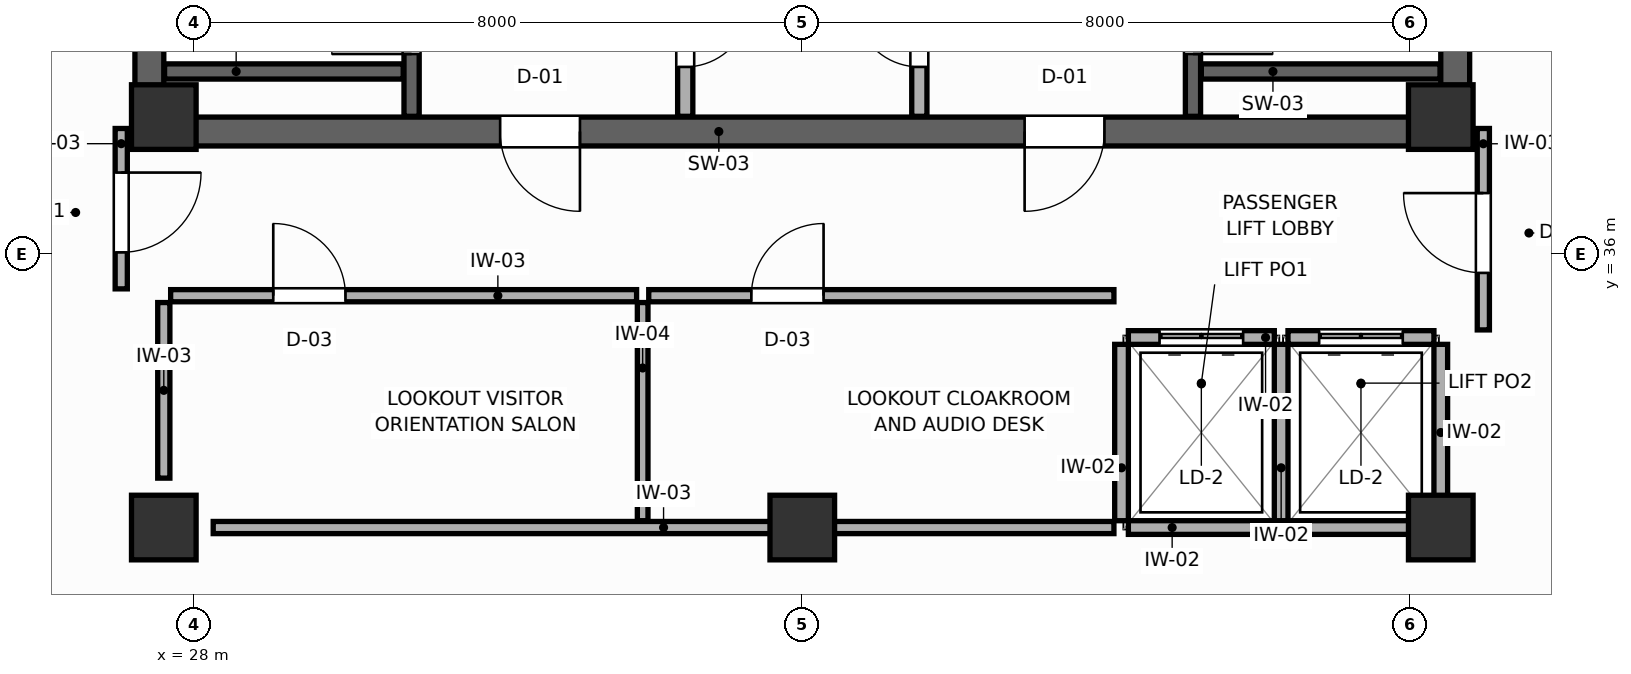
"""IFC4 building model, lengths in metres.
Left out: names, types, materials, properties, quantities, classifications, styles, units other than length and angle.
Written with IfcOpenShell. Run it as: python <this file> out.ifc"""

import sys

from ifc_helpers import new_model, si_unit, direction, frame, frame_2d, origin, origin_2d, place, context, subcontext, project, spatial, rectangle, extrude, source, transform, mapped, element, fill, save


model = new_model("IFC4")
c1 = context("Model", 3, precision=1e-05, world=origin(), true_north=direction((0.0, 1.0)))
c2 = subcontext(c1, "Body", "Model", "MODEL_VIEW")
j1 = project(units=[si_unit("LENGTHUNIT", "METRE"), si_unit("PLANEANGLEUNIT", "RADIAN")], contexts=[c1])
p1 = place(None, origin())
s1 = spatial("IfcSite", under=j1, at=p1, CompositionType="ELEMENT")
p2 = place(p1, origin())
s2 = spatial("IfcBuilding", under=s1, at=p2, CompositionType="ELEMENT")
p3 = place(p2, frame((0.0, 0.0, 288.0)))
s3 = spatial("IfcBuildingStorey", under=s2, at=p3, CompositionType="ELEMENT", Elevation=288.0)
p4 = place(p3, frame((27.22, 37.61, 0.0), z_axis=(0.0, 0.0, 1.0), x_axis=(1.0, 0.0, 0.0)))
e1 = element("IfcWall", 1, at=p4, inside=s3, PredefinedType="SHEAR", context=c2, shape_type="SweptSolid", body=[
    extrude(rectangle(XDim=17.56, YDim=0.38, at=frame_2d((8.78, 0.0))), origin(), (0.0, 0.0, 1.0), 4.2),
])
p5 = place(p4, frame((4.805, 0.0, 0.0)))
e2 = element("IfcOpeningElement", 2, at=p5, cuts=e1, PredefinedType="OPENING", context=c2, shape_type="SweptSolid", body=[
    extrude(rectangle(XDim=1.05, YDim=2.1, at=frame_2d((0.525, 1.05))), frame((0.0, 0.2, 0.0), z_axis=(0.0, -1.0, 0.0), x_axis=(1.0, 0.0, 0.0)), (0.0, 0.0, 1.0), 0.4),
])
p6 = place(p4, frame((11.705, 0.0, 0.0)))
e3 = element("IfcOpeningElement", 3, at=p6, cuts=e1, PredefinedType="OPENING", context=c2, shape_type="SweptSolid", body=[
    extrude(rectangle(XDim=1.05, YDim=2.1, at=frame_2d((0.525, 1.05))), frame((0.0, 0.2, 0.0), z_axis=(0.0, -1.0, 0.0), x_axis=(1.0, 0.0, 0.0)), (0.0, 0.0, 1.0), 0.4),
])
for number, where, z_axis, x_axis in (
    (4, (27.41, 37.8, 0.0), (0.0, 0.0, 1.0), (0.0, 1.0, 0.0)),
    (5, (44.59, 37.8, 0.0), (0.0, 0.0, 1.0), (0.0, 1.0, 0.0)),
):
    element("IfcWall", number, at=place(p3, frame(where, z_axis=z_axis, x_axis=x_axis)), inside=s3, PredefinedType="SHEAR", context=c2, shape_type="SweptSolid", body=[
        extrude(rectangle(XDim=9.0, YDim=0.38, at=frame_2d((4.5, 0.0))), origin(), (0.0, 0.0, 1.0), 4.2),
    ])
m1 = source(origin(), c2, "Body", "SweptSolid", [
    extrude(rectangle(XDim=0.85, YDim=0.85, at=origin_2d()), origin(), (0.0, 0.0, 1.0), 4.2),
])
for number, where, z_axis, x_axis in (
    (6, (27.6, 37.8, 0.0), (0.0, 0.0, 1.0), (1.0, 0.0, 0.0)),
    (7, (44.4, 37.8, 0.0), (0.0, 0.0, 1.0), (1.0, 0.0, 0.0)),
    (8, (27.6, 32.4, 0.0), (0.0, 0.0, 1.0), (1.0, 0.0, 0.0)),
    (9, (44.4, 32.4, 0.0), (0.0, 0.0, 1.0), (1.0, 0.0, 0.0)),
    (10, (36.0, 32.4, 0.0), (0.0, 0.0, 1.0), (1.0, 0.0, 0.0)),
):
    element("IfcColumn", number, at=place(p3, frame(where, z_axis=z_axis, x_axis=x_axis)), inside=s3, PredefinedType="COLUMN", context=c2, shape_type="MappedRepresentation", body=[
        mapped(m1, transform((0.0, 0.0, 0.0), scale=1.0)),
    ])
p7 = place(p3, frame((30.86, 37.81, 0.0), z_axis=(0.0, 0.0, 1.0), x_axis=(0.0, 1.0, 0.0)))
e11 = element("IfcWall", 11, at=p7, inside=s3, PredefinedType="SHEAR", context=c2, shape_type="SweptSolid", body=[
    extrude(rectangle(XDim=8.98, YDim=0.2, at=frame_2d((4.49, 0.0))), origin(), (0.0, 0.0, 1.0), 4.2),
])
p8 = place(p7, frame((0.82, 0.0, 0.0)))
e12 = element("IfcOpeningElement", 12, at=p8, cuts=e11, PredefinedType="OPENING", context=c2, shape_type="SweptSolid", body=[
    extrude(rectangle(XDim=1.05, YDim=2.1, at=frame_2d((0.525, 1.05))), frame((0.0, 0.11, 0.0), z_axis=(0.0, -1.0, 0.0), x_axis=(1.0, 0.0, 0.0)), (0.0, 0.0, 1.0), 0.22),
])
p9 = place(p3, frame((27.61, 38.4, 0.0), z_axis=(0.0, 0.0, 1.0), x_axis=(1.0, 0.0, 0.0)))
e13 = element("IfcWall", 13, at=p9, inside=s3, PredefinedType="SHEAR", context=c2, shape_type="SweptSolid", body=[
    extrude(rectangle(XDim=3.14, YDim=0.2, at=frame_2d((1.57, 0.0))), origin(), (0.0, 0.0, 1.0), 4.2),
])
p10 = place(p3, frame((41.14, 37.81, 0.0), z_axis=(0.0, 0.0, 1.0), x_axis=(0.0, 1.0, 0.0)))
e14 = element("IfcWall", 14, at=p10, inside=s3, PredefinedType="SHEAR", context=c2, shape_type="SweptSolid", body=[
    extrude(rectangle(XDim=8.98, YDim=0.2, at=frame_2d((4.49, 0.0))), origin(), (0.0, 0.0, 1.0), 4.2),
])
p11 = place(p10, frame((0.82, 0.0, 0.0)))
e15 = element("IfcOpeningElement", 15, at=p11, cuts=e14, PredefinedType="OPENING", context=c2, shape_type="SweptSolid", body=[
    extrude(rectangle(XDim=1.05, YDim=2.1, at=frame_2d((0.525, 1.05))), frame((0.0, 0.11, 0.0), z_axis=(0.0, -1.0, 0.0), x_axis=(1.0, 0.0, 0.0)), (0.0, 0.0, 1.0), 0.22),
])
p12 = place(p3, frame((41.25, 38.4, 0.0), z_axis=(0.0, 0.0, 1.0), x_axis=(1.0, 0.0, 0.0)))
e16 = element("IfcWall", 16, at=p12, inside=s3, PredefinedType="SHEAR", context=c2, shape_type="SweptSolid", body=[
    extrude(rectangle(XDim=3.14, YDim=0.2, at=frame_2d((1.57, 0.0))), origin(), (0.0, 0.0, 1.0), 4.2),
])
p13 = place(p3, frame((34.46, 37.81, 0.0), z_axis=(0.0, 0.0, 1.0), x_axis=(0.0, 1.0, 0.0)))
e17 = element("IfcWall", 17, at=p13, inside=s3, PredefinedType="PARTITIONING", context=c2, shape_type="SweptSolid", body=[
    extrude(rectangle(XDim=8.98, YDim=0.2, at=frame_2d((4.49, 0.0))), origin(), (0.0, 0.0, 1.0), 3.95),
])
p14 = place(p13, frame((0.65, 0.0, 0.0)))
e18 = element("IfcOpeningElement", 18, at=p14, cuts=e17, PredefinedType="OPENING", context=c2, shape_type="SweptSolid", body=[
    extrude(rectangle(XDim=0.85, YDim=2.05, at=frame_2d((0.425, 1.025))), frame((0.0, 0.11, 0.0), z_axis=(0.0, -1.0, 0.0), x_axis=(1.0, 0.0, 0.0)), (0.0, 0.0, 1.0), 0.22),
])
p15 = place(p3, frame((37.54, 37.81, 0.0), z_axis=(0.0, 0.0, 1.0), x_axis=(0.0, 1.0, 0.0)))
e19 = element("IfcWall", 19, at=p15, inside=s3, PredefinedType="PARTITIONING", context=c2, shape_type="SweptSolid", body=[
    extrude(rectangle(XDim=8.98, YDim=0.2, at=frame_2d((4.49, 0.0))), origin(), (0.0, 0.0, 1.0), 3.95),
])
p16 = place(p15, frame((0.65, 0.0, 0.0)))
e20 = element("IfcOpeningElement", 20, at=p16, cuts=e19, PredefinedType="OPENING", context=c2, shape_type="SweptSolid", body=[
    extrude(rectangle(XDim=0.85, YDim=2.05, at=frame_2d((0.425, 1.025))), frame((0.0, 0.11, 0.0), z_axis=(0.0, -1.0, 0.0), x_axis=(1.0, 0.0, 0.0)), (0.0, 0.0, 1.0), 0.22),
])
p17 = place(p3, frame((40.29, 34.9, 0.0), z_axis=(0.0, 0.0, 1.0), x_axis=(1.0, 0.0, 0.0)))
e21 = element("IfcWall", 21, at=p17, inside=s3, PredefinedType="PARTITIONING", context=c2, shape_type="SweptSolid", body=[
    extrude(rectangle(XDim=1.92, YDim=0.18, at=frame_2d((0.96, 0.0))), origin(), (0.0, 0.0, 1.0), 3.95),
])
p18 = place(p17, frame((0.41, 0.0, 0.0)))
e22 = element("IfcOpeningElement", 22, at=p18, cuts=e21, PredefinedType="OPENING", context=c2, shape_type="SweptSolid", body=[
    extrude(rectangle(XDim=1.1, YDim=2.1, at=frame_2d((0.55, 1.05))), frame((0.0, 0.1, 0.0), z_axis=(0.0, -1.0, 0.0), x_axis=(1.0, 0.0, 0.0)), (0.0, 0.0, 1.0), 0.2),
])
p19 = place(p3, frame((40.29, 32.4, 0.0), z_axis=(0.0, 0.0, 1.0), x_axis=(1.0, 0.0, 0.0)))
e23 = element("IfcWall", 23, at=p19, inside=s3, PredefinedType="PARTITIONING", context=c2, shape_type="SweptSolid", body=[
    extrude(rectangle(XDim=1.92, YDim=0.18, at=frame_2d((0.96, 0.0))), origin(), (0.0, 0.0, 1.0), 2.51),
])
p20 = place(p3, frame((40.2, 32.49, 0.0), z_axis=(0.0, 0.0, 1.0), x_axis=(0.0, 1.0, 0.0)))
e24 = element("IfcWall", 24, at=p20, inside=s3, PredefinedType="PARTITIONING", context=c2, shape_type="SweptSolid", body=[
    extrude(rectangle(XDim=2.32, YDim=0.18, at=frame_2d((1.16, 0.0))), origin(), (0.0, 0.0, 1.0), 3.95),
])
p21 = place(p3, frame((42.39, 34.9, 0.0), z_axis=(0.0, 0.0, 1.0), x_axis=(1.0, 0.0, 0.0)))
e25 = element("IfcWall", 25, at=p21, inside=s3, PredefinedType="PARTITIONING", context=c2, shape_type="SweptSolid", body=[
    extrude(rectangle(XDim=1.92, YDim=0.18, at=frame_2d((0.96, 0.0))), origin(), (0.0, 0.0, 1.0), 3.95),
])
p22 = place(p21, frame((0.41, 0.0, 0.0)))
e26 = element("IfcOpeningElement", 26, at=p22, cuts=e25, PredefinedType="OPENING", context=c2, shape_type="SweptSolid", body=[
    extrude(rectangle(XDim=1.1, YDim=2.1, at=frame_2d((0.55, 1.05))), frame((0.0, 0.1, 0.0), z_axis=(0.0, -1.0, 0.0), x_axis=(1.0, 0.0, 0.0)), (0.0, 0.0, 1.0), 0.2),
])
p23 = place(p3, frame((42.39, 32.4, 0.0), z_axis=(0.0, 0.0, 1.0), x_axis=(1.0, 0.0, 0.0)))
e27 = element("IfcWall", 27, at=p23, inside=s3, PredefinedType="PARTITIONING", context=c2, shape_type="SweptSolid", body=[
    extrude(rectangle(XDim=1.92, YDim=0.18, at=frame_2d((0.96, 0.0))), origin(), (0.0, 0.0, 1.0), 2.51),
])
for number, where, z_axis, x_axis in (
    (28, (42.3, 32.49, 0.0), (0.0, 0.0, 1.0), (0.0, 1.0, 0.0)),
    (29, (44.4, 32.49, 0.0), (0.0, 0.0, 1.0), (0.0, 1.0, 0.0)),
):
    element("IfcWall", number, at=place(p3, frame(where, z_axis=z_axis, x_axis=x_axis)), inside=s3, PredefinedType="PARTITIONING", context=c2, shape_type="SweptSolid", body=[
        extrude(rectangle(XDim=2.32, YDim=0.18, at=frame_2d((1.16, 0.0))), origin(), (0.0, 0.0, 1.0), 3.95),
    ])
p24 = place(p3, frame((28.25, 32.4, 0.0), z_axis=(0.0, 0.0, 1.0), x_axis=(1.0, 0.0, 0.0)))
e30 = element("IfcWall", 30, at=p24, inside=s3, PredefinedType="PARTITIONING", context=c2, shape_type="SweptSolid", body=[
    extrude(rectangle(XDim=11.85, YDim=0.16, at=frame_2d((5.925, 0.0))), origin(), (0.0, 0.0, 1.0), 2.51),
])
p25 = place(p3, frame((27.6, 33.05, 0.0), z_axis=(0.0, 0.0, 1.0), x_axis=(0.0, 1.0, 0.0)))
e31 = element("IfcWall", 31, at=p25, inside=s3, PredefinedType="PARTITIONING", context=c2, shape_type="SweptSolid", body=[
    extrude(rectangle(XDim=2.31, YDim=0.16, at=frame_2d((1.155, 0.0))), origin(), (0.0, 0.0, 1.0), 3.95),
])
p26 = place(p3, frame((33.9, 32.49, 0.0), z_axis=(0.0, 0.0, 1.0), x_axis=(0.0, 1.0, 0.0)))
e32 = element("IfcWall", 32, at=p26, inside=s3, PredefinedType="PARTITIONING", context=c2, shape_type="SweptSolid", body=[
    extrude(rectangle(XDim=2.87, YDim=0.14, at=frame_2d((1.435, 0.0))), origin(), (0.0, 0.0, 1.0), 3.95),
])
p27 = place(p3, frame((27.69, 35.45, 0.0), z_axis=(0.0, 0.0, 1.0), x_axis=(1.0, 0.0, 0.0)))
e33 = element("IfcWall", 33, at=p27, inside=s3, PredefinedType="PARTITIONING", context=c2, shape_type="SweptSolid", body=[
    extrude(rectangle(XDim=6.13, YDim=0.16, at=frame_2d((3.065, 0.0))), origin(), (0.0, 0.0, 1.0), 3.95),
])
p28 = place(p27, frame((1.35, 0.0, 0.0)))
e34 = element("IfcOpeningElement", 34, at=p28, cuts=e33, PredefinedType="OPENING", context=c2, shape_type="SweptSolid", body=[
    extrude(rectangle(XDim=0.95, YDim=2.05, at=frame_2d((0.475, 1.025))), frame((0.0, 0.09, 0.0), z_axis=(0.0, -1.0, 0.0), x_axis=(1.0, 0.0, 0.0)), (0.0, 0.0, 1.0), 0.18),
])
p29 = place(p3, frame((33.98, 35.45, 0.0), z_axis=(0.0, 0.0, 1.0), x_axis=(1.0, 0.0, 0.0)))
e35 = element("IfcWall", 35, at=p29, inside=s3, PredefinedType="PARTITIONING", context=c2, shape_type="SweptSolid", body=[
    extrude(rectangle(XDim=6.12, YDim=0.16, at=frame_2d((3.06, 0.0))), origin(), (0.0, 0.0, 1.0), 3.95),
])
p30 = place(p29, frame((1.35, 0.0, 0.0)))
e36 = element("IfcOpeningElement", 36, at=p30, cuts=e35, PredefinedType="OPENING", context=c2, shape_type="SweptSolid", body=[
    extrude(rectangle(XDim=0.95, YDim=2.05, at=frame_2d((0.475, 1.025))), frame((0.0, 0.09, 0.0), z_axis=(0.0, -1.0, 0.0), x_axis=(1.0, 0.0, 0.0)), (0.0, 0.0, 1.0), 0.18),
])
p31 = place(p3, frame((27.04, 35.54, 0.0), z_axis=(0.0, 0.0, 1.0), x_axis=(0.0, 1.0, 0.0)))
e37 = element("IfcWall", 37, at=p31, inside=s3, PredefinedType="PARTITIONING", context=c2, shape_type="SweptSolid", body=[
    extrude(rectangle(XDim=2.11, YDim=0.16, at=frame_2d((1.055, 0.0))), origin(), (0.0, 0.0, 1.0), 3.95),
])
p32 = place(p31, frame((0.48, 0.0, 0.0)))
e38 = element("IfcOpeningElement", 38, at=p32, cuts=e37, PredefinedType="OPENING", context=c2, shape_type="SweptSolid", body=[
    extrude(rectangle(XDim=1.05, YDim=2.1, at=frame_2d((0.525, 1.05))), frame((0.0, 0.09, 0.0), z_axis=(0.0, -1.0, 0.0), x_axis=(1.0, 0.0, 0.0)), (0.0, 0.0, 1.0), 0.18),
])
p33 = place(p3, frame((44.96, 35.0, 0.0), z_axis=(0.0, 0.0, 1.0), x_axis=(0.0, 1.0, 0.0)))
e39 = element("IfcWall", 39, at=p33, inside=s3, PredefinedType="PARTITIONING", context=c2, shape_type="SweptSolid", body=[
    extrude(rectangle(XDim=2.65, YDim=0.16, at=frame_2d((1.325, 0.0))), origin(), (0.0, 0.0, 1.0), 3.95),
])
p34 = place(p33, frame((0.75, 0.0, 0.0)))
e40 = element("IfcOpeningElement", 40, at=p34, cuts=e39, PredefinedType="OPENING", context=c2, shape_type="SweptSolid", body=[
    extrude(rectangle(XDim=1.05, YDim=2.1, at=frame_2d((0.525, 1.05))), frame((0.0, 0.09, 0.0), z_axis=(0.0, -1.0, 0.0), x_axis=(1.0, 0.0, 0.0)), (0.0, 0.0, 1.0), 0.18),
])
p35 = place(p8, origin())
e41 = element("IfcDoor", 41, at=p35, inside=s3, OperationType="SINGLE_SWING_LEFT", PredefinedType="DOOR", context=c2, shape_type="SweptSolid", body=[
    extrude(rectangle(XDim=1.05, YDim=2.1, at=frame_2d((0.525, 1.05))), frame((0.0, 0.025, 0.0), z_axis=(0.0, -1.0, 0.0), x_axis=(1.0, 0.0, 0.0)), (0.0, 0.0, 1.0), 0.05),
])
fill(e12, e41)
p36 = place(p11, frame((1.05, 0.0, 0.0), z_axis=(0.0, 0.0, 1.0), x_axis=(-1.0, 0.0, 0.0)))
e42 = element("IfcDoor", 42, at=p36, inside=s3, OperationType="SINGLE_SWING_RIGHT", PredefinedType="DOOR", context=c2, shape_type="SweptSolid", body=[
    extrude(rectangle(XDim=1.05, YDim=2.1, at=frame_2d((0.525, 1.05))), frame((0.0, 0.025, 0.0), z_axis=(0.0, -1.0, 0.0), x_axis=(1.0, 0.0, 0.0)), (0.0, 0.0, 1.0), 0.05),
])
fill(e15, e42)
p37 = place(p14, frame((0.85, 0.0, 0.0), z_axis=(0.0, 0.0, 1.0), x_axis=(-1.0, 0.0, 0.0)))
e43 = element("IfcDoor", 43, at=p37, inside=s3, OperationType="SINGLE_SWING_LEFT", PredefinedType="DOOR", context=c2, shape_type="SweptSolid", body=[
    extrude(rectangle(XDim=0.85, YDim=2.05, at=frame_2d((0.425, 1.025))), frame((0.0, 0.025, 0.0), z_axis=(0.0, -1.0, 0.0), x_axis=(1.0, 0.0, 0.0)), (0.0, 0.0, 1.0), 0.05),
])
fill(e18, e43)
p38 = place(p16, origin())
e44 = element("IfcDoor", 44, at=p38, inside=s3, OperationType="SINGLE_SWING_RIGHT", PredefinedType="DOOR", context=c2, shape_type="SweptSolid", body=[
    extrude(rectangle(XDim=0.85, YDim=2.05, at=frame_2d((0.425, 1.025))), frame((0.0, 0.025, 0.0), z_axis=(0.0, -1.0, 0.0), x_axis=(1.0, 0.0, 0.0)), (0.0, 0.0, 1.0), 0.05),
])
fill(e20, e44)
p39 = place(p18, origin())
e45 = element("IfcDoor", 45, at=p39, inside=s3, OperationType="DOUBLE_DOOR_SLIDING", PredefinedType="DOOR", context=c2, shape_type="SweptSolid", body=[
    extrude(rectangle(XDim=1.1, YDim=2.1, at=frame_2d((0.55, 1.05))), frame((0.0, 0.025, 0.0), z_axis=(0.0, -1.0, 0.0), x_axis=(1.0, 0.0, 0.0)), (0.0, 0.0, 1.0), 0.05),
])
fill(e22, e45)
p40 = place(p22, origin())
e46 = element("IfcDoor", 46, at=p40, inside=s3, OperationType="DOUBLE_DOOR_SLIDING", PredefinedType="DOOR", context=c2, shape_type="SweptSolid", body=[
    extrude(rectangle(XDim=1.1, YDim=2.1, at=frame_2d((0.55, 1.05))), frame((0.0, 0.025, 0.0), z_axis=(0.0, -1.0, 0.0), x_axis=(1.0, 0.0, 0.0)), (0.0, 0.0, 1.0), 0.05),
])
fill(e26, e46)
p41 = place(p28, origin())
e47 = element("IfcDoor", 47, at=p41, inside=s3, OperationType="SINGLE_SWING_LEFT", PredefinedType="DOOR", context=c2, shape_type="SweptSolid", body=[
    extrude(rectangle(XDim=0.95, YDim=2.05, at=frame_2d((0.475, 1.025))), frame((0.0, 0.025, 0.0), z_axis=(0.0, -1.0, 0.0), x_axis=(1.0, 0.0, 0.0)), (0.0, 0.0, 1.0), 0.05),
])
fill(e34, e47)
p42 = place(p30, origin())
e48 = element("IfcDoor", 48, at=p42, inside=s3, OperationType="SINGLE_SWING_RIGHT", PredefinedType="DOOR", context=c2, shape_type="SweptSolid", body=[
    extrude(rectangle(XDim=0.95, YDim=2.05, at=frame_2d((0.475, 1.025))), frame((0.0, 0.025, 0.0), z_axis=(0.0, -1.0, 0.0), x_axis=(1.0, 0.0, 0.0)), (0.0, 0.0, 1.0), 0.05),
])
fill(e36, e48)
p43 = place(p32, frame((1.05, 0.0, 0.0), z_axis=(0.0, 0.0, 1.0), x_axis=(-1.0, 0.0, 0.0)))
e49 = element("IfcDoor", 49, at=p43, inside=s3, OperationType="SINGLE_SWING_LEFT", PredefinedType="DOOR", context=c2, shape_type="SweptSolid", body=[
    extrude(rectangle(XDim=1.05, YDim=2.1, at=frame_2d((0.525, 1.05))), frame((0.0, 0.025, 0.0), z_axis=(0.0, -1.0, 0.0), x_axis=(1.0, 0.0, 0.0)), (0.0, 0.0, 1.0), 0.05),
])
fill(e38, e49)
p44 = place(p34, origin())
e50 = element("IfcDoor", 50, at=p44, inside=s3, OperationType="SINGLE_SWING_RIGHT", PredefinedType="DOOR", context=c2, shape_type="SweptSolid", body=[
    extrude(rectangle(XDim=1.05, YDim=2.1, at=frame_2d((0.525, 1.05))), frame((0.0, 0.025, 0.0), z_axis=(0.0, -1.0, 0.0), x_axis=(1.0, 0.0, 0.0)), (0.0, 0.0, 1.0), 0.05),
])
fill(e40, e50)
p45 = place(p5, frame((1.05, 0.0, 0.0), z_axis=(0.0, 0.0, 1.0), x_axis=(-1.0, 0.0, 0.0)))
e51 = element("IfcDoor", 51, at=p45, inside=s3, OperationType="SINGLE_SWING_LEFT", PredefinedType="DOOR", context=c2, shape_type="SweptSolid", body=[
    extrude(rectangle(XDim=1.05, YDim=2.1, at=frame_2d((0.525, 1.05))), frame((0.0, 0.025, 0.0), z_axis=(0.0, -1.0, 0.0), x_axis=(1.0, 0.0, 0.0)), (0.0, 0.0, 1.0), 0.05),
])
fill(e2, e51)
p46 = place(p6, frame((1.05, 0.0, 0.0), z_axis=(0.0, 0.0, 1.0), x_axis=(-1.0, 0.0, 0.0)))
e52 = element("IfcDoor", 52, at=p46, inside=s3, OperationType="SINGLE_SWING_RIGHT", PredefinedType="DOOR", context=c2, shape_type="SweptSolid", body=[
    extrude(rectangle(XDim=1.05, YDim=2.1, at=frame_2d((0.525, 1.05))), frame((0.0, 0.025, 0.0), z_axis=(0.0, -1.0, 0.0), x_axis=(1.0, 0.0, 0.0)), (0.0, 0.0, 1.0), 0.05),
])
fill(e3, e52)
save(model, sys.argv[1])
